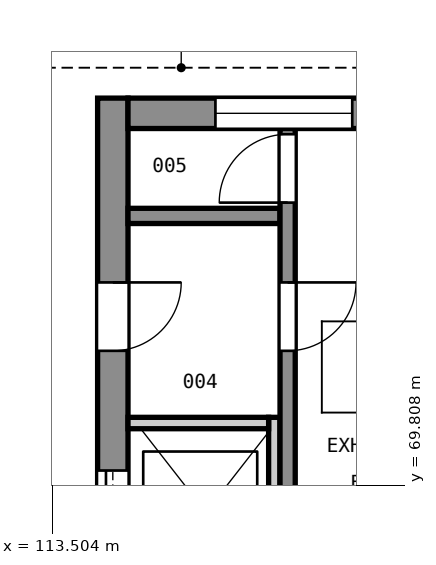
"""IFC4 building model, lengths in metres.
Left out: names, types, materials, properties, quantities, classifications, styles, units other than length and angle.
Written with IfcOpenShell. Run it as: python <this file> out.ifc"""

import sys

from ifc_helpers import new_model, si_unit, direction, frame, frame_2d, origin, place, context, subcontext, project, spatial, rectangle, extrude, element, fill, save


model = new_model("IFC4")
c1 = context("Model", 3, precision=1e-05, world=origin(), true_north=direction((0.0, 1.0)))
c2 = subcontext(c1, "Body", "Model", "MODEL_VIEW")
j1 = project(units=[si_unit("LENGTHUNIT", "METRE"), si_unit("PLANEANGLEUNIT", "RADIAN")], contexts=[c1])
p1 = place(None, origin())
s1 = spatial("IfcSite", under=j1, at=p1, CompositionType="ELEMENT")
p2 = place(p1, origin())
s2 = spatial("IfcBuilding", under=s1, at=p2, CompositionType="ELEMENT")
p3 = place(p2, frame((0.0, 0.0, 46.2)))
s3 = spatial("IfcBuildingStorey", under=s2, at=p3, CompositionType="ELEMENT", Elevation=46.2)
p4 = place(p3, frame((114.3, 60.1, 0.0), z_axis=(0.0, 0.0, 1.0), x_axis=(0.0, 1.0, 0.0)))
e1 = element("IfcWall", 1, at=p4, inside=s3, PredefinedType="SHEAR", context=c2, shape_type="SweptSolid", body=[
    extrude(rectangle(XDim=14.8, YDim=0.4, at=frame_2d((7.4, 0.0))), origin(), (0.0, 0.0, 1.0), 4.8),
])
p5 = place(p4, frame((8.8, 0.0, 0.0)))
e2 = element("IfcOpeningElement", 2, at=p5, cuts=e1, PredefinedType="OPENING", context=c2, shape_type="SweptSolid", body=[
    extrude(rectangle(XDim=1.1, YDim=2.1, at=frame_2d((0.55, 1.05))), frame((0.0, 0.21, 0.0), z_axis=(0.0, -1.0, 0.0), x_axis=(1.0, 0.0, 0.0)), (0.0, 0.0, 1.0), 0.42),
])
p6 = place(p4, frame((0.5, 0.0, 0.0)))
e3 = element("IfcOpeningElement", 3, at=p6, cuts=e1, PredefinedType="OPENING", context=c2, shape_type="SweptSolid", body=[
    extrude(rectangle(XDim=1.4, YDim=2.1, at=frame_2d((0.7, 1.05))), frame((0.0, 0.21, 0.0), z_axis=(0.0, -1.0, 0.0), x_axis=(1.0, 0.0, 0.0)), (0.0, 0.0, 1.0), 0.42),
])
p7 = place(p4, frame((6.5, 0.0, 3.4)))
e4 = element("IfcOpeningElement", 4, at=p7, cuts=e1, PredefinedType="OPENING", context=c2, shape_type="SweptSolid", body=[
    extrude(rectangle(XDim=1.8, YDim=1.2, at=frame_2d((0.9, 0.6))), frame((0.0, 0.21, 0.0), z_axis=(0.0, -1.0, 0.0), x_axis=(1.0, 0.0, 0.0)), (0.0, 0.0, 1.0), 0.42),
])
p8 = place(p4, frame((11.475, 0.0, 0.0)))
e5 = element("IfcOpeningElement", 5, at=p8, cuts=e1, PredefinedType="OPENING", context=c2, shape_type="SweptSolid", body=[
    extrude(rectangle(XDim=0.9, YDim=2.1, at=frame_2d((0.45, 1.05))), frame((0.0, 0.21, 0.0), z_axis=(0.0, -1.0, 0.0), x_axis=(1.0, 0.0, 0.0)), (0.0, 0.0, 1.0), 0.42),
])
p9 = place(p3, frame((118.6, 74.7, 0.0), z_axis=(0.0, 0.0, 1.0), x_axis=(-1.0, 0.0, 0.0)))
e6 = element("IfcWall", 6, at=p9, inside=s3, PredefinedType="SHEAR", context=c2, shape_type="SweptSolid", body=[
    extrude(rectangle(XDim=4.1, YDim=0.4, at=frame_2d((2.05, 0.0))), origin(), (0.0, 0.0, 1.0), 4.8),
])
p10 = place(p9, frame((1.15, 0.0, 3.4)))
e7 = element("IfcOpeningElement", 7, at=p10, cuts=e6, PredefinedType="OPENING", context=c2, shape_type="SweptSolid", body=[
    extrude(rectangle(XDim=1.8, YDim=1.2, at=frame_2d((0.9, 0.6))), frame((0.0, 0.21, 0.0), z_axis=(0.0, -1.0, 0.0), x_axis=(1.0, 0.0, 0.0)), (0.0, 0.0, 1.0), 0.42),
])
p11 = place(p3, frame((116.425, 68.2, 0.0), z_axis=(0.0, 0.0, 1.0), x_axis=(0.0, 1.0, 0.0)))
e8 = element("IfcWall", 8, at=p11, inside=s3, PredefinedType="SOLIDWALL", context=c2, shape_type="SweptSolid", body=[
    extrude(rectangle(XDim=2.5, YDim=0.15, at=frame_2d((1.25, 0.0))), origin(), (0.0, 0.0, 1.0), 4.8),
])
p12 = place(p3, frame((116.35, 70.625, 0.0), z_axis=(0.0, 0.0, 1.0), x_axis=(-1.0, 0.0, 0.0)))
e9 = element("IfcWall", 9, at=p12, inside=s3, PredefinedType="SOLIDWALL", context=c2, shape_type="SweptSolid", body=[
    extrude(rectangle(XDim=1.85, YDim=0.15, at=frame_2d((0.925, 0.0))), origin(), (0.0, 0.0, 1.0), 4.8),
])
p13 = place(p3, frame((114.5, 73.35, 0.0), z_axis=(0.0, 0.0, 1.0), x_axis=(1.0, 0.0, 0.0)))
e10 = element("IfcWall", 10, at=p13, inside=s3, PredefinedType="SOLIDWALL", context=c2, shape_type="SweptSolid", body=[
    extrude(rectangle(XDim=2.0, YDim=0.2, at=frame_2d((1.0, 0.0))), origin(), (0.0, 0.0, 1.0), 4.8),
])
p14 = place(p3, frame((116.6, 68.225, 0.0), z_axis=(0.0, 0.0, 1.0), x_axis=(0.0, 1.0, 0.0)))
e11 = element("IfcWall", 11, at=p14, inside=s3, PredefinedType="SOLIDWALL", context=c2, shape_type="SweptSolid", body=[
    extrude(rectangle(XDim=6.275, YDim=0.2, at=frame_2d((3.137, 0.0))), origin(), (0.0, 0.0, 1.0), 4.8),
])
p15 = place(p14, frame((3.35, 0.0, 0.0)))
e12 = element("IfcOpeningElement", 12, at=p15, cuts=e11, PredefinedType="OPENING", context=c2, shape_type="SweptSolid", body=[
    extrude(rectangle(XDim=0.9, YDim=2.1, at=frame_2d((0.45, 1.05))), frame((0.0, 0.11, 0.0), z_axis=(0.0, -1.0, 0.0), x_axis=(1.0, 0.0, 0.0)), (0.0, 0.0, 1.0), 0.22),
])
p16 = place(p14, frame((5.3, 0.0, 0.0)))
e13 = element("IfcOpeningElement", 13, at=p16, cuts=e11, PredefinedType="OPENING", context=c2, shape_type="SweptSolid", body=[
    extrude(rectangle(XDim=0.9, YDim=2.1, at=frame_2d((0.45, 1.05))), frame((0.0, 0.11, 0.0), z_axis=(0.0, -1.0, 0.0), x_axis=(1.0, 0.0, 0.0)), (0.0, 0.0, 1.0), 0.22),
])
p17 = place(p5, origin())
e14 = element("IfcDoor", 14, at=p17, inside=s3, OperationType="SLIDING_TO_LEFT", PredefinedType="DOOR", context=c2, shape_type="SweptSolid", body=[
    extrude(rectangle(XDim=1.1, YDim=2.1, at=frame_2d((0.55, 1.05))), frame((0.0, 0.025, 0.0), z_axis=(0.0, -1.0, 0.0), x_axis=(1.0, 0.0, 0.0)), (0.0, 0.0, 1.0), 0.05),
])
fill(e2, e14)
p18 = place(p10, origin())
e15 = element("IfcWindow", 15, at=p18, inside=s3, PartitioningType="SINGLE_PANEL", PredefinedType="USERDEFINED", context=c2, shape_type="SweptSolid", body=[
    extrude(rectangle(XDim=1.8, YDim=1.2, at=frame_2d((0.9, 0.6))), frame((0.0, 0.03, 0.0), z_axis=(0.0, -1.0, 0.0), x_axis=(1.0, 0.0, 0.0)), (0.0, 0.0, 1.0), 0.06),
])
fill(e7, e15)
p19 = place(p8, frame((0.9, 0.0, 0.0), z_axis=(0.0, 0.0, 1.0), x_axis=(-1.0, 0.0, 0.0)))
e16 = element("IfcDoor", 16, at=p19, inside=s3, OperationType="SINGLE_SWING_LEFT", PredefinedType="DOOR", context=c2, shape_type="SweptSolid", body=[
    extrude(rectangle(XDim=0.9, YDim=2.1, at=frame_2d((0.45, 1.05))), frame((0.0, 0.025, 0.0), z_axis=(0.0, -1.0, 0.0), x_axis=(1.0, 0.0, 0.0)), (0.0, 0.0, 1.0), 0.05),
])
fill(e5, e16)
p20 = place(p15, frame((0.9, 0.0, 0.0), z_axis=(0.0, 0.0, 1.0), x_axis=(-1.0, 0.0, 0.0)))
e17 = element("IfcDoor", 17, at=p20, inside=s3, OperationType="SINGLE_SWING_LEFT", PredefinedType="DOOR", context=c2, shape_type="SweptSolid", body=[
    extrude(rectangle(XDim=0.9, YDim=2.1, at=frame_2d((0.45, 1.05))), frame((0.0, 0.025, 0.0), z_axis=(0.0, -1.0, 0.0), x_axis=(1.0, 0.0, 0.0)), (0.0, 0.0, 1.0), 0.05),
])
fill(e12, e17)
p21 = place(p16, origin())
e18 = element("IfcDoor", 18, at=p21, inside=s3, OperationType="SINGLE_SWING_LEFT", PredefinedType="DOOR", context=c2, shape_type="SweptSolid", body=[
    extrude(rectangle(XDim=0.9, YDim=2.1, at=frame_2d((0.45, 1.05))), frame((0.0, 0.025, 0.0), z_axis=(0.0, -1.0, 0.0), x_axis=(1.0, 0.0, 0.0)), (0.0, 0.0, 1.0), 0.05),
])
fill(e13, e18)
save(model, sys.argv[1])
